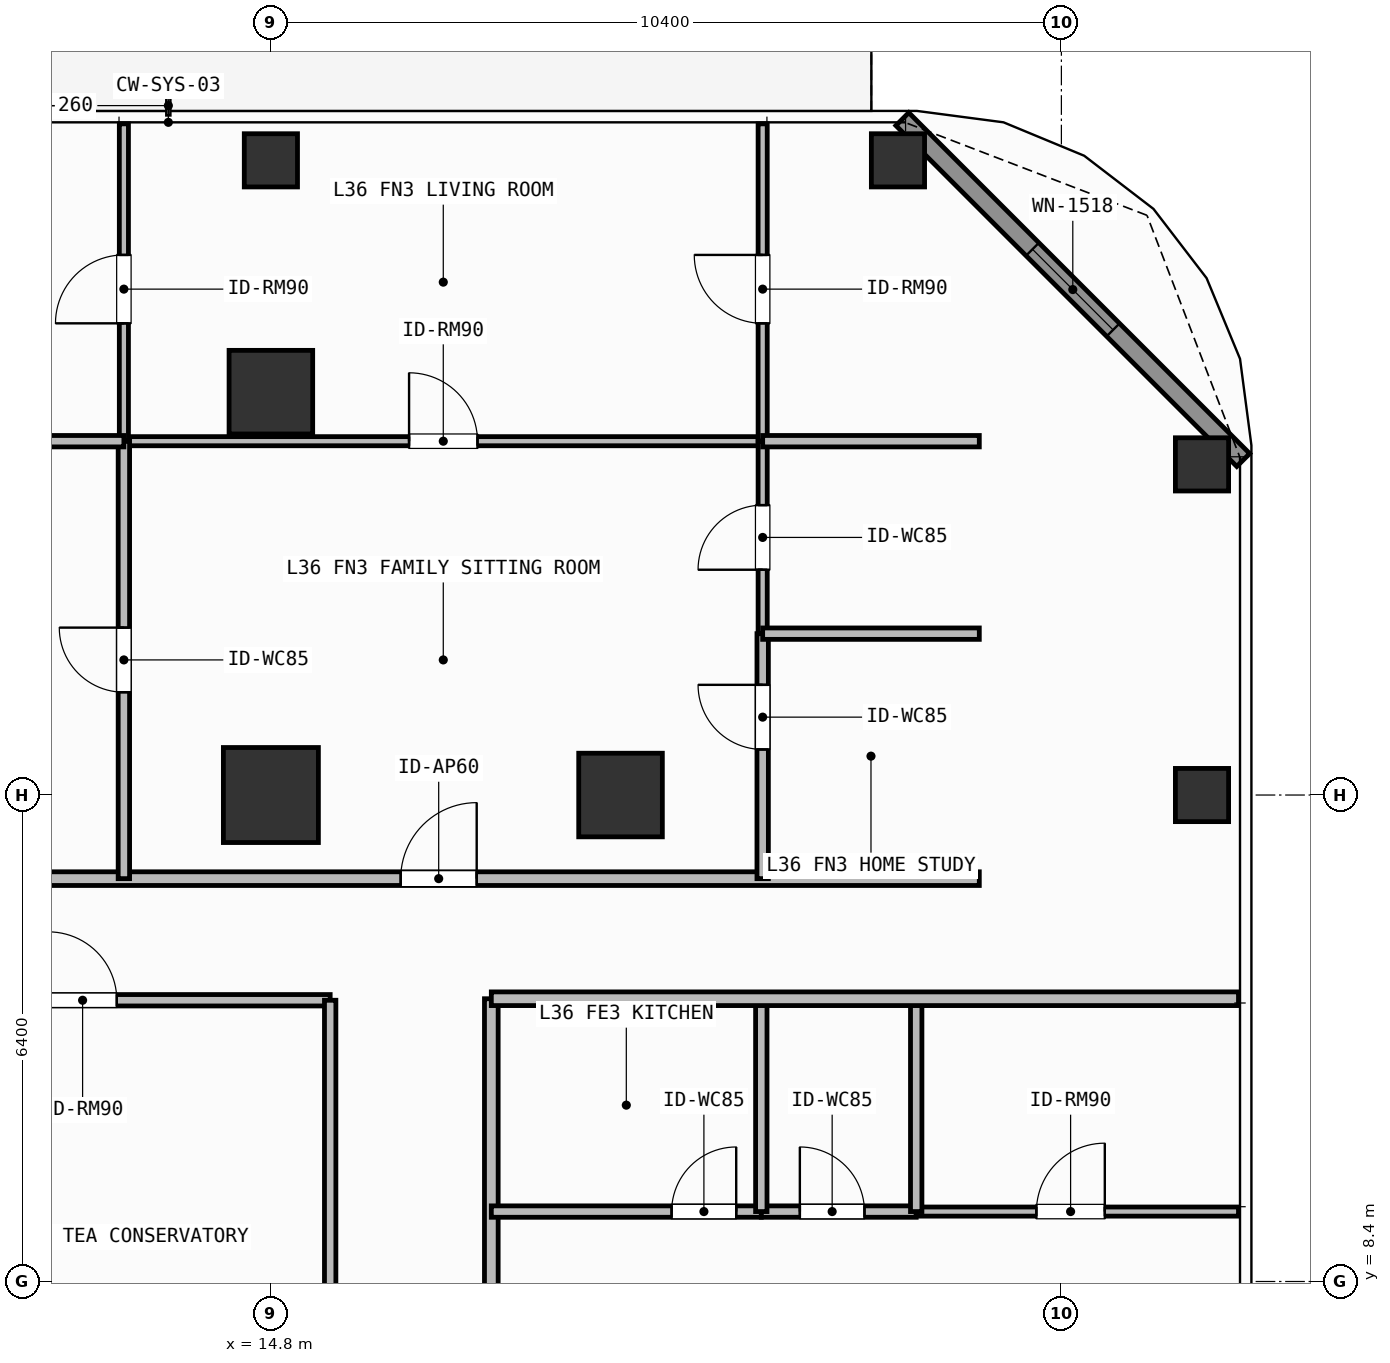
"""IFC4 building model, lengths in metres.
Left out: names, types, materials, properties, quantities, classifications, styles, units other than length and angle.
Written with IfcOpenShell. Run it as: python <this file> out.ifc"""

import sys

from ifc_helpers import new_model, si_unit, direction, frame, frame_2d, origin, origin_2d, place, context, subcontext, project, spatial, rectangle, hollow_rectangle, extrude, element, fill, save


model = new_model("IFC4")
c1 = context("Model", 3, precision=1e-05, world=origin(), true_north=direction((0.0, 1.0)))
c2 = subcontext(c1, "Body", "Model", "MODEL_VIEW")
j1 = project(units=[si_unit("LENGTHUNIT", "METRE"), si_unit("PLANEANGLEUNIT", "RADIAN")], contexts=[c1])
p1 = place(None, origin())
s1 = spatial("IfcSite", under=j1, at=p1, CompositionType="ELEMENT")
p2 = place(p1, origin())
s2 = spatial("IfcBuilding", under=s1, at=p2, CompositionType="ELEMENT")
p3 = place(p2, frame((0.0, 0.0, 144.6)))
s3 = spatial("IfcBuildingStorey", under=s2, at=p3, CompositionType="ELEMENT", Elevation=144.6)
p4 = place(p3, frame((14.8, 14.8, 0.0), z_axis=(0.0, 0.0, 1.0), x_axis=(1.0, 0.0, 0.0)))
e1 = element("IfcColumn", 1, at=p4, inside=s3, PredefinedType="COLUMN", context=c2, shape_type="SweptSolid", body=[
    extrude(rectangle(XDim=1.25, YDim=1.25, at=origin_2d()), origin(), (0.0, 0.0, 1.0), 3.9),
])
for number, where, z_axis, x_axis in (
    (2, (19.4, 14.8, 0.0), (0.0, 0.0, 1.0), (1.0, 0.0, 0.0)),
    (3, (14.8, 20.1, 0.0), (0.0, 0.0, 1.0), (1.0, 0.0, 0.0)),
):
    element("IfcColumn", number, at=place(p3, frame(where, z_axis=z_axis, x_axis=x_axis)), inside=s3, PredefinedType="COLUMN", context=c2, shape_type="SweptSolid", body=[
        extrude(rectangle(XDim=1.1, YDim=1.1, at=origin_2d()), origin(), (0.0, 0.0, 1.0), 3.9),
    ])
for number, where, z_axis, x_axis in (
    (4, (23.05, 23.15, 0.0), (0.0, 0.0, 1.0), (1.0, 0.0, 0.0)),
    (5, (27.05, 19.15, 0.0), (0.0, 0.0, 1.0), (1.0, 0.0, 0.0)),
    (6, (14.8, 23.15, 0.0), (0.0, 0.0, 1.0), (1.0, 0.0, 0.0)),
    (7, (27.05, 14.8, 0.0), (0.0, 0.0, 1.0), (1.0, 0.0, 0.0)),
):
    element("IfcColumn", number, at=place(p3, frame(where, z_axis=z_axis, x_axis=x_axis)), inside=s3, PredefinedType="COLUMN", context=c2, shape_type="SweptSolid", body=[
        extrude(hollow_rectangle(XDim=0.7, YDim=0.7, WallThickness=0.032, at=origin_2d()), origin(), (0.0, 0.0, 1.0), 3.9),
    ])
p5 = place(p3, frame((23.108, 23.692, 0.0), z_axis=(0.0, 0.0, 1.0), x_axis=(0.707087534163, -0.707126027686, 0.0)))
e8 = element("IfcWall", 8, at=p5, inside=s3, PredefinedType="SOLIDWALL", context=c2, shape_type="SweptSolid", body=[
    extrude(rectangle(XDim=6.342, YDim=0.24, at=frame_2d((3.171, 0.0))), origin(), (0.0, 0.0, 1.0), 3.68),
])
p6 = place(p5, frame((2.421, 0.0, 0.8)))
e9 = element("IfcOpeningElement", 9, at=p6, cuts=e8, PredefinedType="OPENING", context=c2, shape_type="SweptSolid", body=[
    extrude(rectangle(XDim=1.5, YDim=1.85, at=frame_2d((0.75, 0.925))), frame((0.0, 0.13, 0.0), z_axis=(0.0, -1.0, 0.0), x_axis=(1.0, 0.0, 0.0)), (0.0, 0.0, 1.0), 0.26),
])
p7 = place(p3, frame((8.36, 12.1, 0.0), z_axis=(0.0, 0.0, 1.0), x_axis=(1.0, 0.0, 0.0)))
e10 = element("IfcWall", 10, at=p7, inside=s3, PredefinedType="PARTITIONING", context=c2, shape_type="SweptSolid", body=[
    extrude(rectangle(XDim=7.22, YDim=0.15, at=frame_2d((3.61, 0.0))), origin(), (0.0, 0.0, 1.0), 3.68),
])
p8 = place(p7, frame((3.513, 0.0, 0.0)))
e11 = element("IfcOpeningElement", 11, at=p8, cuts=e10, PredefinedType="OPENING", context=c2, shape_type="SweptSolid", body=[
    extrude(rectangle(XDim=0.9, YDim=2.1, at=frame_2d((0.45, 1.05))), frame((0.0, 0.085, 0.0), z_axis=(0.0, -1.0, 0.0), x_axis=(1.0, 0.0, 0.0)), (0.0, 0.0, 1.0), 0.17),
])
p9 = place(p3, frame((8.82, 13.7, 0.0), z_axis=(0.0, 0.0, 1.0), x_axis=(1.0, 0.0, 0.0)))
e12 = element("IfcWall", 12, at=p9, inside=s3, PredefinedType="PARTITIONING", context=c2, shape_type="SweptSolid", body=[
    extrude(rectangle(XDim=15.3, YDim=0.18, at=frame_2d((7.65, 0.0))), origin(), (0.0, 0.0, 1.0), 3.68),
])
p10 = place(p9, frame((7.688, 0.0, 0.0)))
e13 = element("IfcOpeningElement", 13, at=p10, cuts=e12, PredefinedType="OPENING", context=c2, shape_type="SweptSolid", body=[
    extrude(rectangle(XDim=1.0, YDim=2.2, at=frame_2d((0.5, 1.1))), frame((0.0, 0.1, 0.0), z_axis=(0.0, -1.0, 0.0), x_axis=(1.0, 0.0, 0.0)), (0.0, 0.0, 1.0), 0.2),
])
p11 = place(p3, frame((12.866, 19.455, 0.0), z_axis=(0.0, 0.0, 1.0), x_axis=(1.0, 0.0, 0.0)))
e14 = element("IfcWall", 14, at=p11, inside=s3, PredefinedType="PARTITIONING", context=c2, shape_type="SweptSolid", body=[
    extrude(rectangle(XDim=8.404, YDim=0.12, at=frame_2d((4.202, 0.0))), origin(), (0.0, 0.0, 1.0), 3.68),
])
p12 = place(p11, frame((3.752, 0.0, 0.0)))
e15 = element("IfcOpeningElement", 15, at=p12, cuts=e14, PredefinedType="OPENING", context=c2, shape_type="SweptSolid", body=[
    extrude(rectangle(XDim=0.9, YDim=2.1, at=frame_2d((0.45, 1.05))), frame((0.0, 0.07, 0.0), z_axis=(0.0, -1.0, 0.0), x_axis=(1.0, 0.0, 0.0)), (0.0, 0.0, 1.0), 0.14),
])
p13 = place(p3, frame((12.866, 13.7, 0.0), z_axis=(0.0, 0.0, 1.0), x_axis=(0.0, 1.0, 0.0)))
e16 = element("IfcWall", 16, at=p13, inside=s3, PredefinedType="PARTITIONING", context=c2, shape_type="SweptSolid", body=[
    extrude(rectangle(XDim=5.755, YDim=0.15, at=frame_2d((2.877, 0.0))), origin(), (0.0, 0.0, 1.0), 3.68),
])
p14 = place(p13, frame((2.452, 0.0, 0.0)))
e17 = element("IfcOpeningElement", 17, at=p14, cuts=e16, PredefinedType="OPENING", context=c2, shape_type="SweptSolid", body=[
    extrude(rectangle(XDim=0.85, YDim=2.1, at=frame_2d((0.425, 1.05))), frame((0.0, 0.085, 0.0), z_axis=(0.0, -1.0, 0.0), x_axis=(1.0, 0.0, 0.0)), (0.0, 0.0, 1.0), 0.17),
])
p15 = place(p3, frame((12.866, 19.455, 0.0), z_axis=(0.0, 0.0, 1.0), x_axis=(0.0, 1.0, 0.0)))
e18 = element("IfcWall", 18, at=p15, inside=s3, PredefinedType="PARTITIONING", context=c2, shape_type="SweptSolid", body=[
    extrude(rectangle(XDim=4.175, YDim=0.12, at=frame_2d((2.087, 0.0))), origin(), (0.0, 0.0, 1.0), 3.68),
])
p16 = place(p15, frame((1.551, 0.0, 0.0)))
e19 = element("IfcOpeningElement", 19, at=p16, cuts=e18, PredefinedType="OPENING", context=c2, shape_type="SweptSolid", body=[
    extrude(rectangle(XDim=0.9, YDim=2.1, at=frame_2d((0.45, 1.05))), frame((0.0, 0.07, 0.0), z_axis=(0.0, -1.0, 0.0), x_axis=(1.0, 0.0, 0.0)), (0.0, 0.0, 1.0), 0.14),
])
p17 = place(p3, frame((21.27, 13.7, 0.0), z_axis=(0.0, 0.0, 1.0), x_axis=(0.0, 1.0, 0.0)))
e20 = element("IfcWall", 20, at=p17, inside=s3, PredefinedType="PARTITIONING", context=c2, shape_type="SweptSolid", body=[
    extrude(rectangle(XDim=3.223, YDim=0.15, at=frame_2d((1.612, 0.0))), origin(), (0.0, 0.0, 1.0), 3.68),
])
p18 = place(p17, frame((1.7, 0.0, 0.0)))
e21 = element("IfcOpeningElement", 21, at=p18, cuts=e20, PredefinedType="OPENING", context=c2, shape_type="SweptSolid", body=[
    extrude(rectangle(XDim=0.85, YDim=2.1, at=frame_2d((0.425, 1.05))), frame((0.0, 0.085, 0.0), z_axis=(0.0, -1.0, 0.0), x_axis=(1.0, 0.0, 0.0)), (0.0, 0.0, 1.0), 0.17),
])
p19 = place(p3, frame((21.27, 16.923, 0.0), z_axis=(0.0, 0.0, 1.0), x_axis=(0.0, 1.0, 0.0)))
e22 = element("IfcWall", 22, at=p19, inside=s3, PredefinedType="PARTITIONING", context=c2, shape_type="SweptSolid", body=[
    extrude(rectangle(XDim=2.532, YDim=0.12, at=frame_2d((1.266, 0.0))), origin(), (0.0, 0.0, 1.0), 3.68),
])
p20 = place(p19, frame((0.841, 0.0, 0.0)))
e23 = element("IfcOpeningElement", 23, at=p20, cuts=e22, PredefinedType="OPENING", context=c2, shape_type="SweptSolid", body=[
    extrude(rectangle(XDim=0.85, YDim=2.1, at=frame_2d((0.425, 1.05))), frame((0.0, 0.07, 0.0), z_axis=(0.0, -1.0, 0.0), x_axis=(1.0, 0.0, 0.0)), (0.0, 0.0, 1.0), 0.14),
])
p21 = place(p3, frame((21.27, 19.455, 0.0), z_axis=(0.0, 0.0, 1.0), x_axis=(0.0, 1.0, 0.0)))
e24 = element("IfcWall", 24, at=p21, inside=s3, PredefinedType="PARTITIONING", context=c2, shape_type="SweptSolid", body=[
    extrude(rectangle(XDim=4.175, YDim=0.12, at=frame_2d((2.087, 0.0))), origin(), (0.0, 0.0, 1.0), 3.68),
])
p22 = place(p21, frame((1.551, 0.0, 0.0)))
e25 = element("IfcOpeningElement", 25, at=p22, cuts=e24, PredefinedType="OPENING", context=c2, shape_type="SweptSolid", body=[
    extrude(rectangle(XDim=0.9, YDim=2.1, at=frame_2d((0.45, 1.05))), frame((0.0, 0.07, 0.0), z_axis=(0.0, -1.0, 0.0), x_axis=(1.0, 0.0, 0.0)), (0.0, 0.0, 1.0), 0.14),
])
p23 = place(p3, frame((17.7, 4.04, 0.0), z_axis=(0.0, 0.0, 1.0), x_axis=(0.0, 1.0, 0.0)))
e26 = element("IfcWall", 26, at=p23, inside=s3, PredefinedType="PARTITIONING", context=c2, shape_type="SweptSolid", body=[
    extrude(rectangle(XDim=8.08, YDim=0.18, at=frame_2d((4.04, 0.0))), origin(), (0.0, 0.0, 1.0), 3.68),
])
p24 = place(p23, frame((1.761, 0.0, 0.0)))
e27 = element("IfcOpeningElement", 27, at=p24, cuts=e26, PredefinedType="OPENING", context=c2, shape_type="SweptSolid", body=[
    extrude(rectangle(XDim=1.0, YDim=2.2, at=frame_2d((0.5, 1.1))), frame((0.0, 0.1, 0.0), z_axis=(0.0, -1.0, 0.0), x_axis=(1.0, 0.0, 0.0)), (0.0, 0.0, 1.0), 0.2),
])
p25 = place(p3, frame((17.7, 9.32, 0.0), z_axis=(0.0, 0.0, 1.0), x_axis=(1.0, 0.0, 0.0)))
e28 = element("IfcWall", 28, at=p25, inside=s3, PredefinedType="PARTITIONING", context=c2, shape_type="SweptSolid", body=[
    extrude(rectangle(XDim=3.552, YDim=0.15, at=frame_2d((1.776, 0.0))), origin(), (0.0, 0.0, 1.0), 3.68),
])
p26 = place(p25, frame((2.372, 0.0, 0.0)))
e29 = element("IfcOpeningElement", 29, at=p26, cuts=e28, PredefinedType="OPENING", context=c2, shape_type="SweptSolid", body=[
    extrude(rectangle(XDim=0.85, YDim=2.1, at=frame_2d((0.425, 1.05))), frame((0.0, 0.085, 0.0), z_axis=(0.0, -1.0, 0.0), x_axis=(1.0, 0.0, 0.0)), (0.0, 0.0, 1.0), 0.17),
])
p27 = place(p3, frame((21.252, 9.32, 0.0), z_axis=(0.0, 0.0, 1.0), x_axis=(1.0, 0.0, 0.0)))
e30 = element("IfcWall", 30, at=p27, inside=s3, PredefinedType="PARTITIONING", context=c2, shape_type="SweptSolid", body=[
    extrude(rectangle(XDim=2.038, YDim=0.15, at=frame_2d((1.019, 0.0))), origin(), (0.0, 0.0, 1.0), 3.68),
])
p28 = place(p27, frame((0.507, 0.0, 0.0)))
e31 = element("IfcOpeningElement", 31, at=p28, cuts=e30, PredefinedType="OPENING", context=c2, shape_type="SweptSolid", body=[
    extrude(rectangle(XDim=0.85, YDim=2.1, at=frame_2d((0.425, 1.05))), frame((0.0, 0.085, 0.0), z_axis=(0.0, -1.0, 0.0), x_axis=(1.0, 0.0, 0.0)), (0.0, 0.0, 1.0), 0.17),
])
p29 = place(p3, frame((23.29, 9.32, 0.0), z_axis=(0.0, 0.0, 1.0), x_axis=(1.0, 0.0, 0.0)))
e32 = element("IfcWall", 32, at=p29, inside=s3, PredefinedType="PARTITIONING", context=c2, shape_type="SweptSolid", body=[
    extrude(rectangle(XDim=4.24, YDim=0.12, at=frame_2d((2.12, 0.0))), origin(), (0.0, 0.0, 1.0), 3.68),
])
p30 = place(p29, frame((1.581, 0.0, 0.0)))
e33 = element("IfcOpeningElement", 33, at=p30, cuts=e32, PredefinedType="OPENING", context=c2, shape_type="SweptSolid", body=[
    extrude(rectangle(XDim=0.9, YDim=2.1, at=frame_2d((0.45, 1.05))), frame((0.0, 0.07, 0.0), z_axis=(0.0, -1.0, 0.0), x_axis=(1.0, 0.0, 0.0)), (0.0, 0.0, 1.0), 0.14),
])
p31 = place(p3, frame((15.58, 5.85, 0.0), z_axis=(0.0, 0.0, 1.0), x_axis=(0.0, 1.0, 0.0)))
e34 = element("IfcWall", 34, at=p31, inside=s3, PredefinedType="PARTITIONING", context=c2, shape_type="SweptSolid", body=[
    extrude(rectangle(XDim=6.25, YDim=0.15, at=frame_2d((3.125, 0.0))), origin(), (0.0, 0.0, 1.0), 3.68),
])
p32 = place(p3, frame((8.82, 19.455, 0.0), z_axis=(0.0, 0.0, 1.0), x_axis=(1.0, 0.0, 0.0)))
e35 = element("IfcWall", 35, at=p32, inside=s3, PredefinedType="PARTITIONING", context=c2, shape_type="SweptSolid", body=[
    extrude(rectangle(XDim=4.046, YDim=0.15, at=frame_2d((2.023, 0.0))), origin(), (0.0, 0.0, 1.0), 3.68),
])
for number, where, z_axis, x_axis in (
    (36, (21.27, 16.923, 0.0), (0.0, 0.0, 1.0), (1.0, 0.0, 0.0)),
    (37, (21.27, 19.455, 0.0), (0.0, 0.0, 1.0), (1.0, 0.0, 0.0)),
):
    element("IfcWall", number, at=place(p3, frame(where, z_axis=z_axis, x_axis=x_axis)), inside=s3, PredefinedType="PARTITIONING", context=c2, shape_type="SweptSolid", body=[
        extrude(rectangle(XDim=2.85, YDim=0.15, at=frame_2d((1.425, 0.0))), origin(), (0.0, 0.0, 1.0), 3.68),
    ])
for number, where, z_axis, x_axis in (
    (38, (21.252, 9.32, 0.0), (0.0, 0.0, 1.0), (0.0, 1.0, 0.0)),
    (39, (23.29, 9.32, 0.0), (0.0, 0.0, 1.0), (0.0, 1.0, 0.0)),
):
    element("IfcWall", number, at=place(p3, frame(where, z_axis=z_axis, x_axis=x_axis)), inside=s3, PredefinedType="PARTITIONING", context=c2, shape_type="SweptSolid", body=[
        extrude(rectangle(XDim=2.8, YDim=0.15, at=frame_2d((1.4, 0.0))), origin(), (0.0, 0.0, 1.0), 3.68),
    ])
p33 = place(p3, frame((17.7, 12.12, 0.0), z_axis=(0.0, 0.0, 1.0), x_axis=(1.0, 0.0, 0.0)))
e40 = element("IfcWall", 40, at=p33, inside=s3, PredefinedType="PARTITIONING", context=c2, shape_type="SweptSolid", body=[
    extrude(rectangle(XDim=9.83, YDim=0.18, at=frame_2d((4.915, 0.0))), origin(), (0.0, 0.0, 1.0), 3.68),
])
p34 = place(p6, origin())
e41 = element("IfcWindow", 41, at=p34, inside=s3, PartitioningType="SINGLE_PANEL", PredefinedType="WINDOW", context=c2, shape_type="SweptSolid", body=[
    extrude(rectangle(XDim=1.5, YDim=1.85, at=frame_2d((0.75, 0.925))), frame((0.0, 0.03, 0.0), z_axis=(0.0, -1.0, 0.0), x_axis=(1.0, 0.0, 0.0)), (0.0, 0.0, 1.0), 0.06),
])
fill(e9, e41)
p35 = place(p8, origin())
e42 = element("IfcDoor", 42, at=p35, inside=s3, OperationType="SINGLE_SWING_LEFT", PredefinedType="DOOR", context=c2, shape_type="SweptSolid", body=[
    extrude(rectangle(XDim=0.9, YDim=2.1, at=frame_2d((0.45, 1.05))), frame((0.0, 0.025, 0.0), z_axis=(0.0, -1.0, 0.0), x_axis=(1.0, 0.0, 0.0)), (0.0, 0.0, 1.0), 0.05),
])
fill(e11, e42)
p36 = place(p10, origin())
e43 = element("IfcDoor", 43, at=p36, inside=s3, OperationType="SINGLE_SWING_RIGHT", PredefinedType="DOOR", context=c2, shape_type="SweptSolid", body=[
    extrude(rectangle(XDim=1.0, YDim=2.2, at=frame_2d((0.5, 1.1))), frame((0.0, 0.025, 0.0), z_axis=(0.0, -1.0, 0.0), x_axis=(1.0, 0.0, 0.0)), (0.0, 0.0, 1.0), 0.05),
])
fill(e13, e43)
p37 = place(p12, origin())
e44 = element("IfcDoor", 44, at=p37, inside=s3, OperationType="SINGLE_SWING_LEFT", PredefinedType="DOOR", context=c2, shape_type="SweptSolid", body=[
    extrude(rectangle(XDim=0.9, YDim=2.1, at=frame_2d((0.45, 1.05))), frame((0.0, 0.025, 0.0), z_axis=(0.0, -1.0, 0.0), x_axis=(1.0, 0.0, 0.0)), (0.0, 0.0, 1.0), 0.05),
])
fill(e15, e44)
p38 = place(p14, origin())
e45 = element("IfcDoor", 45, at=p38, inside=s3, OperationType="SINGLE_SWING_RIGHT", PredefinedType="DOOR", context=c2, shape_type="SweptSolid", body=[
    extrude(rectangle(XDim=0.85, YDim=2.1, at=frame_2d((0.425, 1.05))), frame((0.0, 0.025, 0.0), z_axis=(0.0, -1.0, 0.0), x_axis=(1.0, 0.0, 0.0)), (0.0, 0.0, 1.0), 0.05),
])
fill(e17, e45)
p39 = place(p16, origin())
e46 = element("IfcDoor", 46, at=p39, inside=s3, OperationType="SINGLE_SWING_LEFT", PredefinedType="DOOR", context=c2, shape_type="SweptSolid", body=[
    extrude(rectangle(XDim=0.9, YDim=2.1, at=frame_2d((0.45, 1.05))), frame((0.0, 0.025, 0.0), z_axis=(0.0, -1.0, 0.0), x_axis=(1.0, 0.0, 0.0)), (0.0, 0.0, 1.0), 0.05),
])
fill(e19, e46)
p40 = place(p18, origin())
e47 = element("IfcDoor", 47, at=p40, inside=s3, OperationType="SINGLE_SWING_RIGHT", PredefinedType="DOOR", context=c2, shape_type="SweptSolid", body=[
    extrude(rectangle(XDim=0.85, YDim=2.1, at=frame_2d((0.425, 1.05))), frame((0.0, 0.025, 0.0), z_axis=(0.0, -1.0, 0.0), x_axis=(1.0, 0.0, 0.0)), (0.0, 0.0, 1.0), 0.05),
])
fill(e21, e47)
p41 = place(p20, origin())
e48 = element("IfcDoor", 48, at=p41, inside=s3, OperationType="SINGLE_SWING_LEFT", PredefinedType="DOOR", context=c2, shape_type="SweptSolid", body=[
    extrude(rectangle(XDim=0.85, YDim=2.1, at=frame_2d((0.425, 1.05))), frame((0.0, 0.025, 0.0), z_axis=(0.0, -1.0, 0.0), x_axis=(1.0, 0.0, 0.0)), (0.0, 0.0, 1.0), 0.05),
])
fill(e23, e48)
p42 = place(p22, origin())
e49 = element("IfcDoor", 49, at=p42, inside=s3, OperationType="SINGLE_SWING_RIGHT", PredefinedType="DOOR", context=c2, shape_type="SweptSolid", body=[
    extrude(rectangle(XDim=0.9, YDim=2.1, at=frame_2d((0.45, 1.05))), frame((0.0, 0.025, 0.0), z_axis=(0.0, -1.0, 0.0), x_axis=(1.0, 0.0, 0.0)), (0.0, 0.0, 1.0), 0.05),
])
fill(e25, e49)
p43 = place(p26, origin())
e50 = element("IfcDoor", 50, at=p43, inside=s3, OperationType="SINGLE_SWING_RIGHT", PredefinedType="DOOR", context=c2, shape_type="SweptSolid", body=[
    extrude(rectangle(XDim=0.85, YDim=2.1, at=frame_2d((0.425, 1.05))), frame((0.0, 0.025, 0.0), z_axis=(0.0, -1.0, 0.0), x_axis=(1.0, 0.0, 0.0)), (0.0, 0.0, 1.0), 0.05),
])
fill(e29, e50)
p44 = place(p28, origin())
e51 = element("IfcDoor", 51, at=p44, inside=s3, OperationType="SINGLE_SWING_LEFT", PredefinedType="DOOR", context=c2, shape_type="SweptSolid", body=[
    extrude(rectangle(XDim=0.85, YDim=2.1, at=frame_2d((0.425, 1.05))), frame((0.0, 0.025, 0.0), z_axis=(0.0, -1.0, 0.0), x_axis=(1.0, 0.0, 0.0)), (0.0, 0.0, 1.0), 0.05),
])
fill(e31, e51)
p45 = place(p30, origin())
e52 = element("IfcDoor", 52, at=p45, inside=s3, OperationType="SINGLE_SWING_RIGHT", PredefinedType="DOOR", context=c2, shape_type="SweptSolid", body=[
    extrude(rectangle(XDim=0.9, YDim=2.1, at=frame_2d((0.45, 1.05))), frame((0.0, 0.025, 0.0), z_axis=(0.0, -1.0, 0.0), x_axis=(1.0, 0.0, 0.0)), (0.0, 0.0, 1.0), 0.05),
])
fill(e33, e52)
save(model, sys.argv[1])
